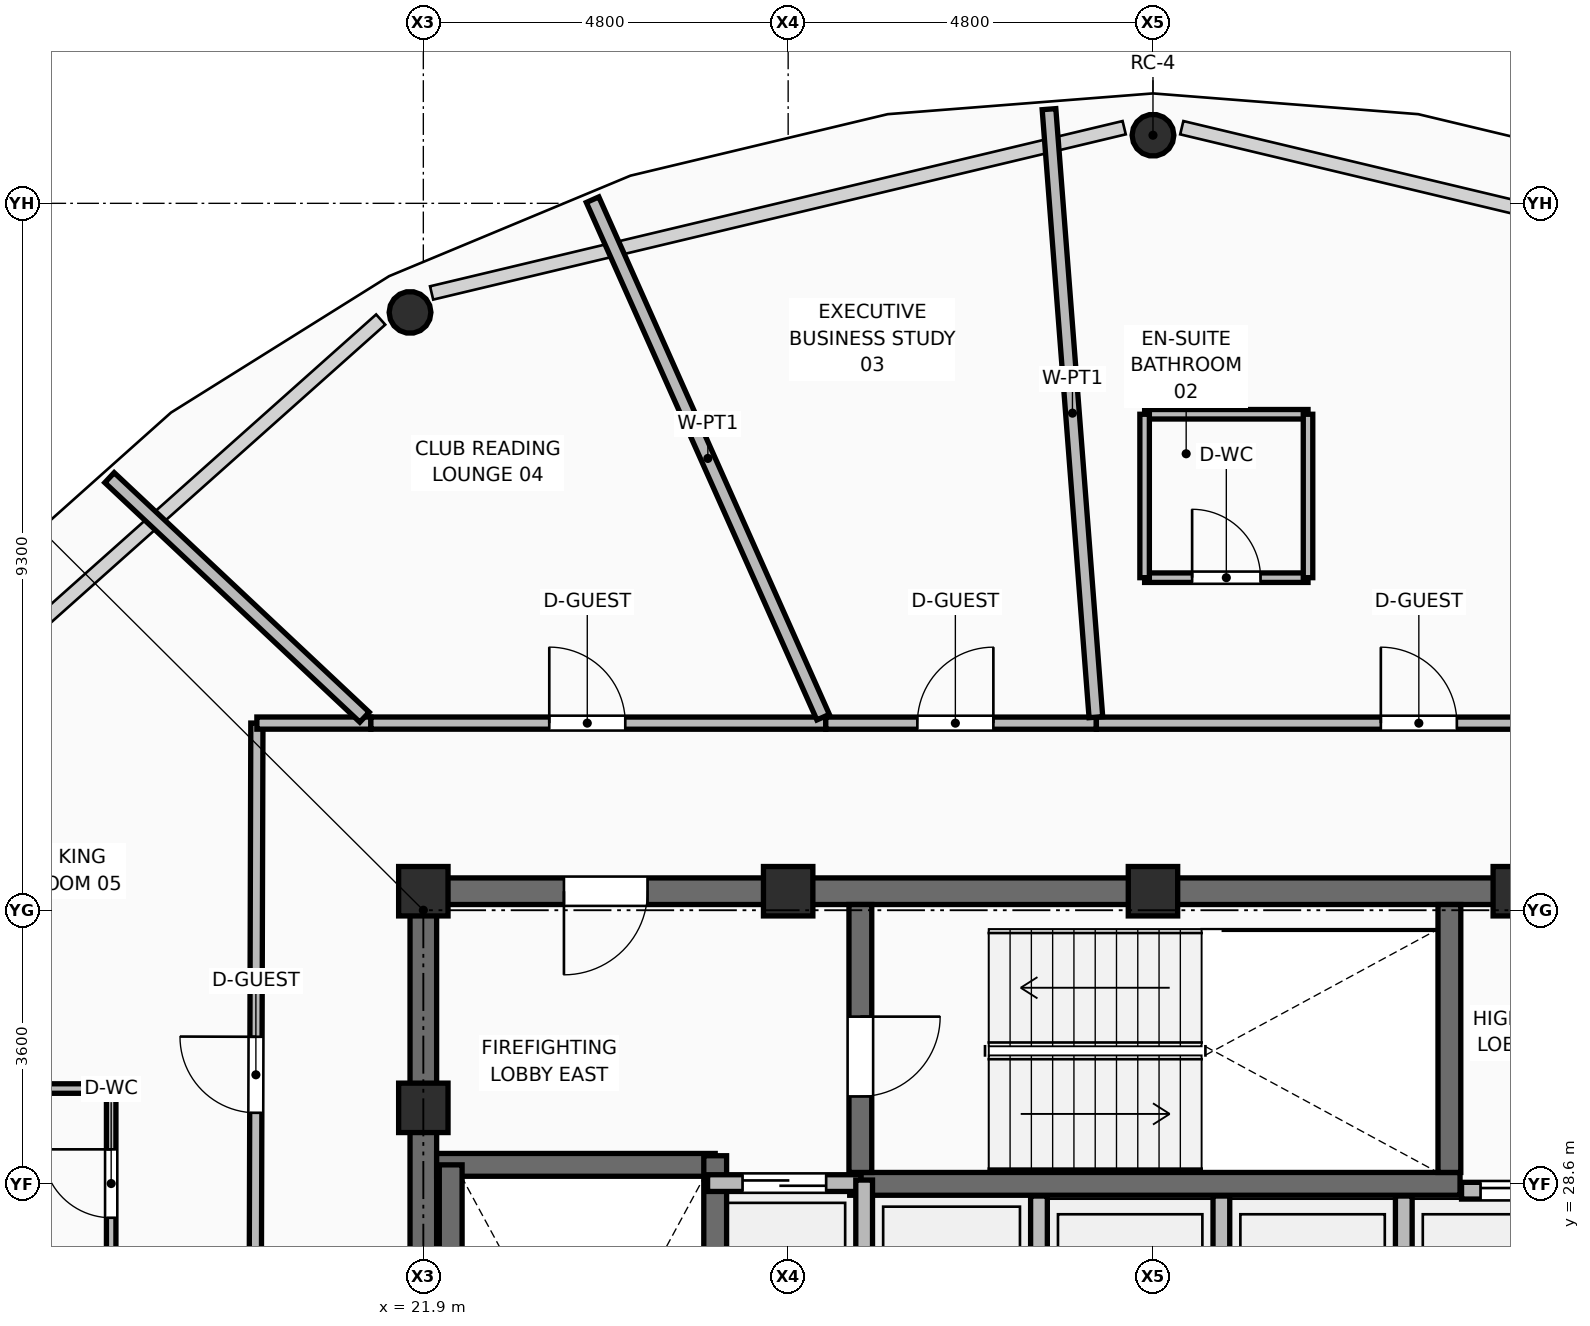
"""IFC4 building model, lengths in metres.
Left out: names, types, materials, properties, quantities, classifications, styles, units other than length and angle.
Written with IfcOpenShell. Run it as: python <this file> out.ifc"""

import sys

from ifc_helpers import new_model, si_unit, direction, frame, frame_2d, origin, origin_2d, place, context, subcontext, project, spatial, rectangle, hollow_circle, extrude, element, fill, save


model = new_model("IFC4")
c1 = context("Model", 3, precision=1e-05, world=origin(), true_north=direction((0.0, 1.0)))
c2 = subcontext(c1, "Body", "Model", "MODEL_VIEW")
j1 = project(units=[si_unit("LENGTHUNIT", "METRE"), si_unit("PLANEANGLEUNIT", "RADIAN")], contexts=[c1])
p1 = place(None, origin())
s1 = spatial("IfcSite", under=j1, at=p1, CompositionType="ELEMENT")
p2 = place(p1, origin())
s2 = spatial("IfcBuilding", under=s1, at=p2, CompositionType="ELEMENT")
p3 = place(p2, frame((0.0, 0.0, 278.85)))
s3 = spatial("IfcBuildingStorey", under=s2, at=p3, CompositionType="ELEMENT", Elevation=278.85)
for number, where, z_axis, x_axis in (
    (1, (21.9, 29.6, 0.0), (0.0, 0.0, 1.0), (1.0, 0.0, 0.0)),
    (2, (21.9, 32.45, 0.0), (0.0, 0.0, 1.0), (1.0, 0.0, 0.0)),
    (3, (26.7, 32.45, 0.0), (0.0, 0.0, 1.0), (1.0, 0.0, 0.0)),
    (4, (31.5, 32.45, 0.0), (0.0, 0.0, 1.0), (1.0, 0.0, 0.0)),
    (5, (36.3, 32.45, 0.0), (0.0, 0.0, 1.0), (1.0, 0.0, 0.0)),
):
    element("IfcColumn", number, at=place(p3, frame(where, z_axis=z_axis, x_axis=x_axis)), inside=s3, PredefinedType="COLUMN", context=c2, shape_type="SweptSolid", body=[
        extrude(rectangle(XDim=0.65, YDim=0.65, at=origin_2d()), origin(), (0.0, 0.0, 1.0), 3.75),
    ])
p4 = place(p3, frame((31.5, 42.396, 0.0), z_axis=(0.0, -0.191376297921, 0.981516740863), x_axis=(1.0, 0.0, 0.0)))
e6 = element("IfcColumn", 6, at=p4, inside=s3, PredefinedType="COLUMN", context=c2, shape_type="SweptSolid", body=[
    extrude(hollow_circle(Radius=0.275, WallThickness=0.025, at=origin_2d()), origin(), (0.0, 0.0, 1.0), 3.637),
])
p5 = place(p3, frame((21.725, 40.065, 0.0), z_axis=(0.107078897733, -0.165345373706, 0.980405537038), x_axis=(0.839360059296, 0.543575837265, 0.0)))
e7 = element("IfcColumn", 7, at=p5, inside=s3, PredefinedType="COLUMN", context=c2, shape_type="SweptSolid", body=[
    extrude(hollow_circle(Radius=0.275, WallThickness=0.025, at=origin_2d()), origin(), (0.0, 0.0, 1.0), 3.641),
])
p6 = place(p3, frame((30.0, 25.71, 0.0), z_axis=(0.0, 0.0, 1.0), x_axis=(0.0, 1.0, 0.0)))
e8 = element("IfcWall", 8, at=p6, inside=s3, PredefinedType="PARTITIONING", context=c2, shape_type="SweptSolid", body=[
    extrude(rectangle(XDim=2.73, YDim=0.22, at=frame_2d((1.365, 0.0))), origin(), (0.0, 0.0, 1.0), 3.545),
])
p7 = place(p3, frame((32.4, 26.2, 0.0), z_axis=(0.0, 0.0, 1.0), x_axis=(0.0, 1.0, 0.0)))
e9 = element("IfcWall", 9, at=p7, inside=s3, PredefinedType="PARTITIONING", context=c2, shape_type="SweptSolid", body=[
    extrude(rectangle(XDim=2.24, YDim=0.22, at=frame_2d((1.12, 0.0))), origin(), (0.0, 0.0, 1.0), 3.545),
])
p8 = place(p3, frame((34.8, 26.23, 0.0), z_axis=(0.0, 0.0, 1.0), x_axis=(0.0, 1.0, 0.0)))
e10 = element("IfcWall", 10, at=p8, inside=s3, PredefinedType="PARTITIONING", context=c2, shape_type="SweptSolid", body=[
    extrude(rectangle(XDim=2.21, YDim=0.22, at=frame_2d((1.105, 0.0))), origin(), (0.0, 0.0, 1.0), 3.545),
])
p9 = place(p3, frame((21.725, 32.45, 0.0), z_axis=(0.0, 0.0, 1.0), x_axis=(1.0, 0.0, 0.0)))
e11 = element("IfcWall", 11, at=p9, inside=s3, PredefinedType="SHEAR", context=c2, shape_type="SweptSolid", body=[
    extrude(rectangle(XDim=19.55, YDim=0.35, at=frame_2d((9.775, 0.0))), origin(), (0.0, 0.0, 1.0), 3.57),
])
p10 = place(p9, frame((2.025, 0.0, 0.0)))
e12 = element("IfcOpeningElement", 12, at=p10, cuts=e11, PredefinedType="OPENING", context=c2, shape_type="SweptSolid", body=[
    extrude(rectangle(XDim=1.1, YDim=2.1, at=frame_2d((0.55, 1.05))), frame((0.0, 0.185, 0.0), z_axis=(0.0, -1.0, 0.0), x_axis=(1.0, 0.0, 0.0)), (0.0, 0.0, 1.0), 0.37),
])
p11 = place(p9, frame((15.415, 0.0, 0.0)))
e13 = element("IfcOpeningElement", 13, at=p11, cuts=e11, PredefinedType="OPENING", context=c2, shape_type="SweptSolid", body=[
    extrude(rectangle(XDim=1.0, YDim=2.1, at=frame_2d((0.5, 1.05))), frame((0.0, 0.185, 0.0), z_axis=(0.0, -1.0, 0.0), x_axis=(1.0, 0.0, 0.0)), (0.0, 0.0, 1.0), 0.37),
])
p12 = place(p9, frame((17.425, 0.0, 0.0)))
e14 = element("IfcOpeningElement", 14, at=p12, cuts=e11, PredefinedType="OPENING", context=c2, shape_type="SweptSolid", body=[
    extrude(rectangle(XDim=0.9, YDim=2.1, at=frame_2d((0.45, 1.05))), frame((0.0, 0.185, 0.0), z_axis=(0.0, -1.0, 0.0), x_axis=(1.0, 0.0, 0.0)), (0.0, 0.0, 1.0), 0.37),
])
p13 = place(p3, frame((21.9, 17.975, 0.0), z_axis=(0.0, 0.0, 1.0), x_axis=(0.0, 1.0, 0.0)))
e15 = element("IfcWall", 15, at=p13, inside=s3, PredefinedType="SHEAR", context=c2, shape_type="SweptSolid", body=[
    extrude(rectangle(XDim=14.3, YDim=0.35, at=frame_2d((7.15, 0.0))), origin(), (0.0, 0.0, 1.0), 3.57),
])
p14 = place(p3, frame((22.075, 28.85, 0.0), z_axis=(0.0, 0.0, 1.0), x_axis=(1.0, 0.0, 0.0)))
e16 = element("IfcWall", 16, at=p14, inside=s3, PredefinedType="SHEAR", context=c2, shape_type="SweptSolid", body=[
    extrude(rectangle(XDim=3.665, YDim=0.3, at=frame_2d((1.833, 0.0))), origin(), (0.0, 0.0, 1.0), 3.57),
])
p15 = place(p3, frame((25.74, 20.98, 0.0), z_axis=(0.0, 0.0, 1.0), x_axis=(0.0, 1.0, 0.0)))
e17 = element("IfcWall", 17, at=p15, inside=s3, PredefinedType="SHEAR", context=c2, shape_type="SweptSolid", body=[
    extrude(rectangle(XDim=7.99, YDim=0.3, at=frame_2d((3.995, 0.0))), origin(), (0.0, 0.0, 1.0), 3.57),
])
p16 = place(p3, frame((22.26, 21.1, 0.0), z_axis=(0.0, 0.0, 1.0), x_axis=(0.0, 1.0, 0.0)))
e18 = element("IfcWall", 18, at=p16, inside=s3, PredefinedType="SHEAR", context=c2, shape_type="SweptSolid", body=[
    extrude(rectangle(XDim=7.75, YDim=0.3, at=frame_2d((3.875, 0.0))), origin(), (0.0, 0.0, 1.0), 3.57),
])
p17 = place(p3, frame((27.51, 28.6, 0.0), z_axis=(0.0, 0.0, 1.0), x_axis=(1.0, 0.0, 0.0)))
e19 = element("IfcWall", 19, at=p17, inside=s3, PredefinedType="SHEAR", context=c2, shape_type="SweptSolid", body=[
    extrude(rectangle(XDim=8.03, YDim=0.3, at=frame_2d((4.015, 0.0))), origin(), (0.0, 0.0, 1.0), 3.57),
])
p18 = place(p3, frame((27.65, 28.75, 0.0), z_axis=(0.0, 0.0, 1.0), x_axis=(0.0, 1.0, 0.0)))
e20 = element("IfcWall", 20, at=p18, inside=s3, PredefinedType="SHEAR", context=c2, shape_type="SweptSolid", body=[
    extrude(rectangle(XDim=3.525, YDim=0.3, at=frame_2d((1.762, 0.0))), origin(), (0.0, 0.0, 1.0), 3.57),
])
p19 = place(p18, frame((1.0, 0.0, 0.0)))
e21 = element("IfcOpeningElement", 21, at=p19, cuts=e20, PredefinedType="OPENING", context=c2, shape_type="SweptSolid", body=[
    extrude(rectangle(XDim=1.05, YDim=2.1, at=frame_2d((0.525, 1.05))), frame((0.0, 0.16, 0.0), z_axis=(0.0, -1.0, 0.0), x_axis=(1.0, 0.0, 0.0)), (0.0, 0.0, 1.0), 0.32),
])
p20 = place(p3, frame((35.4, 28.75, 0.0), z_axis=(0.0, 0.0, 1.0), x_axis=(0.0, 1.0, 0.0)))
e22 = element("IfcWall", 22, at=p20, inside=s3, PredefinedType="SHEAR", context=c2, shape_type="SweptSolid", body=[
    extrude(rectangle(XDim=3.525, YDim=0.3, at=frame_2d((1.762, 0.0))), origin(), (0.0, 0.0, 1.0), 3.57),
])
p21 = place(p3, frame((25.64, 28.61, 0.0), z_axis=(0.0, 0.0, 1.0), x_axis=(1.0, 0.0, 0.0)))
e23 = element("IfcWall", 23, at=p21, inside=s3, PredefinedType="PARTITIONING", context=c2, shape_type="SweptSolid", body=[
    extrude(rectangle(XDim=2.02, YDim=0.22, at=frame_2d((1.01, 0.0))), origin(), (0.0, 0.0, 1.0), 3.55),
])
p22 = place(p21, frame((0.46, 0.0, 0.0)))
e24 = element("IfcOpeningElement", 24, at=p22, cuts=e23, PredefinedType="OPENING", context=c2, shape_type="SweptSolid", body=[
    extrude(rectangle(XDim=1.1, YDim=2.2, at=frame_2d((0.55, 1.1))), frame((0.0, 0.12, 0.0), z_axis=(0.0, -1.0, 0.0), x_axis=(1.0, 0.0, 0.0)), (0.0, 0.0, 1.0), 0.24),
])
p23 = place(p3, frame((35.56, 28.51, 0.0), z_axis=(0.0, 0.0, 1.0), x_axis=(1.0, 0.0, 0.0)))
e25 = element("IfcWall", 25, at=p23, inside=s3, PredefinedType="PARTITIONING", context=c2, shape_type="SweptSolid", body=[
    extrude(rectangle(XDim=1.6, YDim=0.22, at=frame_2d((0.8, 0.0))), origin(), (0.0, 0.0, 1.0), 3.55),
])
p24 = place(p23, frame((0.25, 0.0, 0.0)))
e26 = element("IfcOpeningElement", 26, at=p24, cuts=e25, PredefinedType="OPENING", context=c2, shape_type="SweptSolid", body=[
    extrude(rectangle(XDim=1.1, YDim=2.2, at=frame_2d((0.55, 1.1))), frame((0.0, 0.12, 0.0), z_axis=(0.0, -1.0, 0.0), x_axis=(1.0, 0.0, 0.0)), (0.0, 0.0, 1.0), 0.24),
])
p25 = place(p3, frame((27.7, 25.65, 0.0), z_axis=(0.0, 0.0, 1.0), x_axis=(0.0, 1.0, 0.0)))
e27 = element("IfcWall", 27, at=p25, inside=s3, PredefinedType="PARTITIONING", context=c2, shape_type="SweptSolid", body=[
    extrude(rectangle(XDim=3.0, YDim=0.22, at=frame_2d((1.5, 0.0))), origin(), (0.0, 0.0, 1.0), 3.55),
])
p26 = place(p3, frame((19.686, 26.142, 0.0), z_axis=(0.0, 0.0, 1.0), x_axis=(0.002808172778, 0.999996057075, 0.0)))
e28 = element("IfcWall", 28, at=p26, inside=s3, PredefinedType="PARTITIONING", context=c2, shape_type="SweptSolid", body=[
    extrude(rectangle(XDim=8.52, YDim=0.16, at=frame_2d((4.26, 0.0))), origin(), (0.0, 0.0, 1.0), 3.132),
])
p27 = place(p26, frame((3.393, 0.0, 0.0)))
e29 = element("IfcOpeningElement", 29, at=p27, cuts=e28, PredefinedType="OPENING", context=c2, shape_type="SweptSolid", body=[
    extrude(rectangle(XDim=1.0, YDim=2.1, at=frame_2d((0.5, 1.05))), frame((0.0, 0.09, 0.0), z_axis=(0.0, -1.0, 0.0), x_axis=(1.0, 0.0, 0.0)), (0.0, 0.0, 1.0), 0.18),
])
p28 = place(p3, frame((19.71, 34.662, 0.0), z_axis=(0.0, 0.0, 1.0), x_axis=(1.0, 0.0, 0.0)))
e30 = element("IfcWall", 30, at=p28, inside=s3, PredefinedType="PARTITIONING", context=c2, shape_type="SweptSolid", body=[
    extrude(rectangle(XDim=1.5, YDim=0.16, at=frame_2d((0.75, 0.0))), origin(), (0.0, 0.0, 1.0), 3.55),
])
p29 = place(p3, frame((21.21, 34.662, 0.0), z_axis=(0.0, 0.0, 1.0), x_axis=(0.999999979201, -0.000203956757, 0.0)))
e31 = element("IfcWall", 31, at=p29, inside=s3, PredefinedType="PARTITIONING", context=c2, shape_type="SweptSolid", body=[
    extrude(rectangle(XDim=5.985, YDim=0.16, at=frame_2d((2.993, 0.0))), origin(), (0.0, 0.0, 1.0), 3.132),
])
p30 = place(p29, frame((2.347, 0.0, 0.0)))
e32 = element("IfcOpeningElement", 32, at=p30, cuts=e31, PredefinedType="OPENING", context=c2, shape_type="SweptSolid", body=[
    extrude(rectangle(XDim=1.0, YDim=2.1, at=frame_2d((0.5, 1.05))), frame((0.0, 0.09, 0.0), z_axis=(0.0, -1.0, 0.0), x_axis=(1.0, 0.0, 0.0)), (0.0, 0.0, 1.0), 0.18),
])
p31 = place(p3, frame((27.195, 34.661, 0.0), z_axis=(0.0, 0.0, 1.0), x_axis=(1.0, 0.0, 0.0)))
e33 = element("IfcWall", 33, at=p31, inside=s3, PredefinedType="PARTITIONING", context=c2, shape_type="SweptSolid", body=[
    extrude(rectangle(XDim=3.56, YDim=0.16, at=frame_2d((1.78, 0.0))), origin(), (0.0, 0.0, 1.0), 3.55),
])
p32 = place(p31, frame((1.205, 0.0, 0.0)))
e34 = element("IfcOpeningElement", 34, at=p32, cuts=e33, PredefinedType="OPENING", context=c2, shape_type="SweptSolid", body=[
    extrude(rectangle(XDim=1.0, YDim=2.1, at=frame_2d((0.5, 1.05))), frame((0.0, 0.09, 0.0), z_axis=(0.0, -1.0, 0.0), x_axis=(1.0, 0.0, 0.0)), (0.0, 0.0, 1.0), 0.18),
])
p33 = place(p3, frame((30.755, 34.661, 0.0), z_axis=(0.0, 0.0, 1.0), x_axis=(1.0, 0.0, 0.0)))
e35 = element("IfcWall", 35, at=p33, inside=s3, PredefinedType="PARTITIONING", context=c2, shape_type="SweptSolid", body=[
    extrude(rectangle(XDim=8.486, YDim=0.16, at=frame_2d((4.243, 0.0))), origin(), (0.0, 0.0, 1.0), 3.132),
])
p34 = place(p33, frame((3.743, 0.0, 0.0)))
e36 = element("IfcOpeningElement", 36, at=p34, cuts=e35, PredefinedType="OPENING", context=c2, shape_type="SweptSolid", body=[
    extrude(rectangle(XDim=1.0, YDim=2.1, at=frame_2d((0.5, 1.05))), frame((0.0, 0.09, 0.0), z_axis=(0.0, -1.0, 0.0), x_axis=(1.0, 0.0, 0.0)), (0.0, 0.0, 1.0), 0.18),
])
p35 = place(p3, frame((30.749, 34.74, 0.0), z_axis=(0.0, 0.0, 1.0), x_axis=(-0.076898952471, 0.997038891473, 0.0)))
e37 = element("IfcWall", 37, at=p35, inside=s3, PredefinedType="PARTITIONING", context=c2, shape_type="SweptSolid", body=[
    extrude(rectangle(XDim=8.023, YDim=0.18, at=frame_2d((4.011, 0.0))), origin(), (0.0, 0.0, 1.0), 3.003),
])
p36 = place(p3, frame((27.16, 34.74, 0.0), z_axis=(0.0, 0.0, 1.0), x_axis=(-0.406937643974, 0.913455939778, 0.0)))
e38 = element("IfcWall", 38, at=p36, inside=s3, PredefinedType="PARTITIONING", context=c2, shape_type="SweptSolid", body=[
    extrude(rectangle(XDim=7.453, YDim=0.18, at=frame_2d((3.727, 0.0))), origin(), (0.0, 0.0, 1.0), 3.003),
])
p37 = place(p3, frame((21.126, 34.74, 0.0), z_axis=(0.0, 0.0, 1.0), x_axis=(-0.728905018714, 0.684614836016, 0.0)))
e39 = element("IfcWall", 39, at=p37, inside=s3, PredefinedType="PARTITIONING", context=c2, shape_type="SweptSolid", body=[
    extrude(rectangle(XDim=4.603, YDim=0.18, at=frame_2d((2.301, 0.0))), origin(), (0.0, 0.0, 1.0), 3.003),
])
p38 = place(p3, frame((31.39, 36.575, 0.0), z_axis=(0.0, 0.0, 1.0), x_axis=(1.0, 0.0, 0.0)))
e40 = element("IfcWall", 40, at=p38, inside=s3, PredefinedType="PARTITIONING", context=c2, shape_type="SweptSolid", body=[
    extrude(rectangle(XDim=2.15, YDim=0.125, at=frame_2d((1.075, 0.0))), origin(), (0.0, 0.0, 1.0), 3.132),
])
p39 = place(p38, frame((0.625, 0.0, 0.0)))
e41 = element("IfcOpeningElement", 41, at=p39, cuts=e40, PredefinedType="OPENING", context=c2, shape_type="SweptSolid", body=[
    extrude(rectangle(XDim=0.9, YDim=2.1, at=frame_2d((0.45, 1.05))), frame((0.0, 0.073, 0.0), z_axis=(0.0, -1.0, 0.0), x_axis=(1.0, 0.0, 0.0)), (0.0, 0.0, 1.0), 0.145),
])
for number, where, z_axis, x_axis in (
    (42, (31.39, 38.725, 0.0), (0.0, 0.0, 1.0), (1.0, 0.0, 0.0)),
    (43, (31.39, 36.575, 0.0), (0.0, 0.0, 1.0), (0.0, 1.0, 0.0)),
):
    element("IfcWall", number, at=place(p3, frame(where, z_axis=z_axis, x_axis=x_axis)), inside=s3, PredefinedType="PARTITIONING", context=c2, shape_type="SweptSolid", body=[
        extrude(rectangle(XDim=2.15, YDim=0.125, at=frame_2d((1.075, 0.0))), origin(), (0.0, 0.0, 1.0), 3.132),
    ])
p40 = place(p3, frame((33.54, 36.575, 0.0), z_axis=(0.0, 0.0, 1.0), x_axis=(0.0, 1.0, 0.0)))
e44 = element("IfcWall", 44, at=p40, inside=s3, PredefinedType="PARTITIONING", context=c2, shape_type="SweptSolid", body=[
    extrude(rectangle(XDim=2.15, YDim=0.125, at=frame_2d((1.075, 0.0))), origin(), (0.0, 0.0, 1.0), 3.55),
])
p41 = place(p3, frame((15.193, 29.854, 0.0), z_axis=(0.0, 0.0, 1.0), x_axis=(1.0, 0.0, 0.0)))
e45 = element("IfcWall", 45, at=p41, inside=s3, PredefinedType="PARTITIONING", context=c2, shape_type="SweptSolid", body=[
    extrude(rectangle(XDim=2.6, YDim=0.125, at=frame_2d((1.3, 0.0))), origin(), (0.0, 0.0, 1.0), 3.55),
])
p42 = place(p3, frame((17.793, 27.354, 0.0), z_axis=(0.0, 0.0, 1.0), x_axis=(0.0, 1.0, 0.0)))
e46 = element("IfcWall", 46, at=p42, inside=s3, PredefinedType="PARTITIONING", context=c2, shape_type="SweptSolid", body=[
    extrude(rectangle(XDim=2.5, YDim=0.125, at=frame_2d((1.25, 0.0))), origin(), (0.0, 0.0, 1.0), 3.55),
])
p43 = place(p42, frame((0.8, 0.0, 0.0)))
e47 = element("IfcOpeningElement", 47, at=p43, cuts=e46, PredefinedType="OPENING", context=c2, shape_type="SweptSolid", body=[
    extrude(rectangle(XDim=0.9, YDim=2.1, at=frame_2d((0.45, 1.05))), frame((0.0, 0.073, 0.0), z_axis=(0.0, -1.0, 0.0), x_axis=(1.0, 0.0, 0.0)), (0.0, 0.0, 1.0), 0.145),
])
p44 = place(p19, frame((1.05, 0.0, 0.0), z_axis=(0.0, 0.0, 1.0), x_axis=(-1.0, 0.0, 0.0)))
e48 = element("IfcDoor", 48, at=p44, inside=s3, OperationType="SINGLE_SWING_LEFT", PredefinedType="DOOR", context=c2, shape_type="SweptSolid", body=[
    extrude(rectangle(XDim=1.05, YDim=2.1, at=frame_2d((0.525, 1.05))), frame((0.0, 0.025, 0.0), z_axis=(0.0, -1.0, 0.0), x_axis=(1.0, 0.0, 0.0)), (0.0, 0.0, 1.0), 0.05),
])
fill(e21, e48)
p45 = place(p22, origin())
e49 = element("IfcDoor", 49, at=p45, inside=s3, OperationType="DOUBLE_DOOR_SLIDING", PredefinedType="DOOR", context=c2, shape_type="SweptSolid", body=[
    extrude(rectangle(XDim=1.1, YDim=2.2, at=frame_2d((0.55, 1.1))), frame((0.0, 0.025, 0.0), z_axis=(0.0, -1.0, 0.0), x_axis=(1.0, 0.0, 0.0)), (0.0, 0.0, 1.0), 0.05),
])
fill(e24, e49)
p46 = place(p24, origin())
e50 = element("IfcDoor", 50, at=p46, inside=s3, OperationType="DOUBLE_DOOR_SLIDING", PredefinedType="DOOR", context=c2, shape_type="SweptSolid", body=[
    extrude(rectangle(XDim=1.1, YDim=2.2, at=frame_2d((0.55, 1.1))), frame((0.0, 0.025, 0.0), z_axis=(0.0, -1.0, 0.0), x_axis=(1.0, 0.0, 0.0)), (0.0, 0.0, 1.0), 0.05),
])
fill(e26, e50)
p47 = place(p10, frame((1.1, 0.0, 0.0), z_axis=(0.0, 0.0, 1.0), x_axis=(-1.0, 0.0, 0.0)))
e51 = element("IfcDoor", 51, at=p47, inside=s3, OperationType="SINGLE_SWING_RIGHT", PredefinedType="DOOR", context=c2, shape_type="SweptSolid", body=[
    extrude(rectangle(XDim=1.1, YDim=2.1, at=frame_2d((0.55, 1.05))), frame((0.0, 0.025, 0.0), z_axis=(0.0, -1.0, 0.0), x_axis=(1.0, 0.0, 0.0)), (0.0, 0.0, 1.0), 0.05),
])
fill(e12, e51)
p48 = place(p39, origin())
e52 = element("IfcDoor", 52, at=p48, inside=s3, OperationType="SINGLE_SWING_LEFT", PredefinedType="DOOR", context=c2, shape_type="SweptSolid", body=[
    extrude(rectangle(XDim=0.9, YDim=2.1, at=frame_2d((0.45, 1.05))), frame((0.0, 0.025, 0.0), z_axis=(0.0, -1.0, 0.0), x_axis=(1.0, 0.0, 0.0)), (0.0, 0.0, 1.0), 0.05),
])
fill(e41, e52)
p49 = place(p34, origin())
e53 = element("IfcDoor", 53, at=p49, inside=s3, OperationType="SINGLE_SWING_LEFT", PredefinedType="DOOR", context=c2, shape_type="SweptSolid", body=[
    extrude(rectangle(XDim=1.0, YDim=2.1, at=frame_2d((0.5, 1.05))), frame((0.0, 0.025, 0.0), z_axis=(0.0, -1.0, 0.0), x_axis=(1.0, 0.0, 0.0)), (0.0, 0.0, 1.0), 0.05),
])
fill(e36, e53)
p50 = place(p32, origin())
e54 = element("IfcDoor", 54, at=p50, inside=s3, OperationType="SINGLE_SWING_RIGHT", PredefinedType="DOOR", context=c2, shape_type="SweptSolid", body=[
    extrude(rectangle(XDim=1.0, YDim=2.1, at=frame_2d((0.5, 1.05))), frame((0.0, 0.025, 0.0), z_axis=(0.0, -1.0, 0.0), x_axis=(1.0, 0.0, 0.0)), (0.0, 0.0, 1.0), 0.05),
])
fill(e34, e54)
p51 = place(p30, origin())
e55 = element("IfcDoor", 55, at=p51, inside=s3, OperationType="SINGLE_SWING_LEFT", PredefinedType="DOOR", context=c2, shape_type="SweptSolid", body=[
    extrude(rectangle(XDim=1.0, YDim=2.1, at=frame_2d((0.5, 1.05))), frame((0.0, 0.025, 0.0), z_axis=(0.0, -1.0, 0.0), x_axis=(1.0, 0.0, 0.0)), (0.0, 0.0, 1.0), 0.05),
])
fill(e32, e55)
p52 = place(p43, origin())
e56 = element("IfcDoor", 56, at=p52, inside=s3, OperationType="SINGLE_SWING_RIGHT", PredefinedType="DOOR", context=c2, shape_type="SweptSolid", body=[
    extrude(rectangle(XDim=0.9, YDim=2.1, at=frame_2d((0.45, 1.05))), frame((0.0, 0.025, 0.0), z_axis=(0.0, -1.0, 0.0), x_axis=(1.0, 0.0, 0.0)), (0.0, 0.0, 1.0), 0.05),
])
fill(e47, e56)
p53 = place(p27, origin())
e57 = element("IfcDoor", 57, at=p53, inside=s3, OperationType="SINGLE_SWING_RIGHT", PredefinedType="DOOR", context=c2, shape_type="SweptSolid", body=[
    extrude(rectangle(XDim=1.0, YDim=2.1, at=frame_2d((0.5, 1.05))), frame((0.0, 0.025, 0.0), z_axis=(0.0, -1.0, 0.0), x_axis=(1.0, 0.0, 0.0)), (0.0, 0.0, 1.0), 0.05),
])
fill(e29, e57)
save(model, sys.argv[1])
